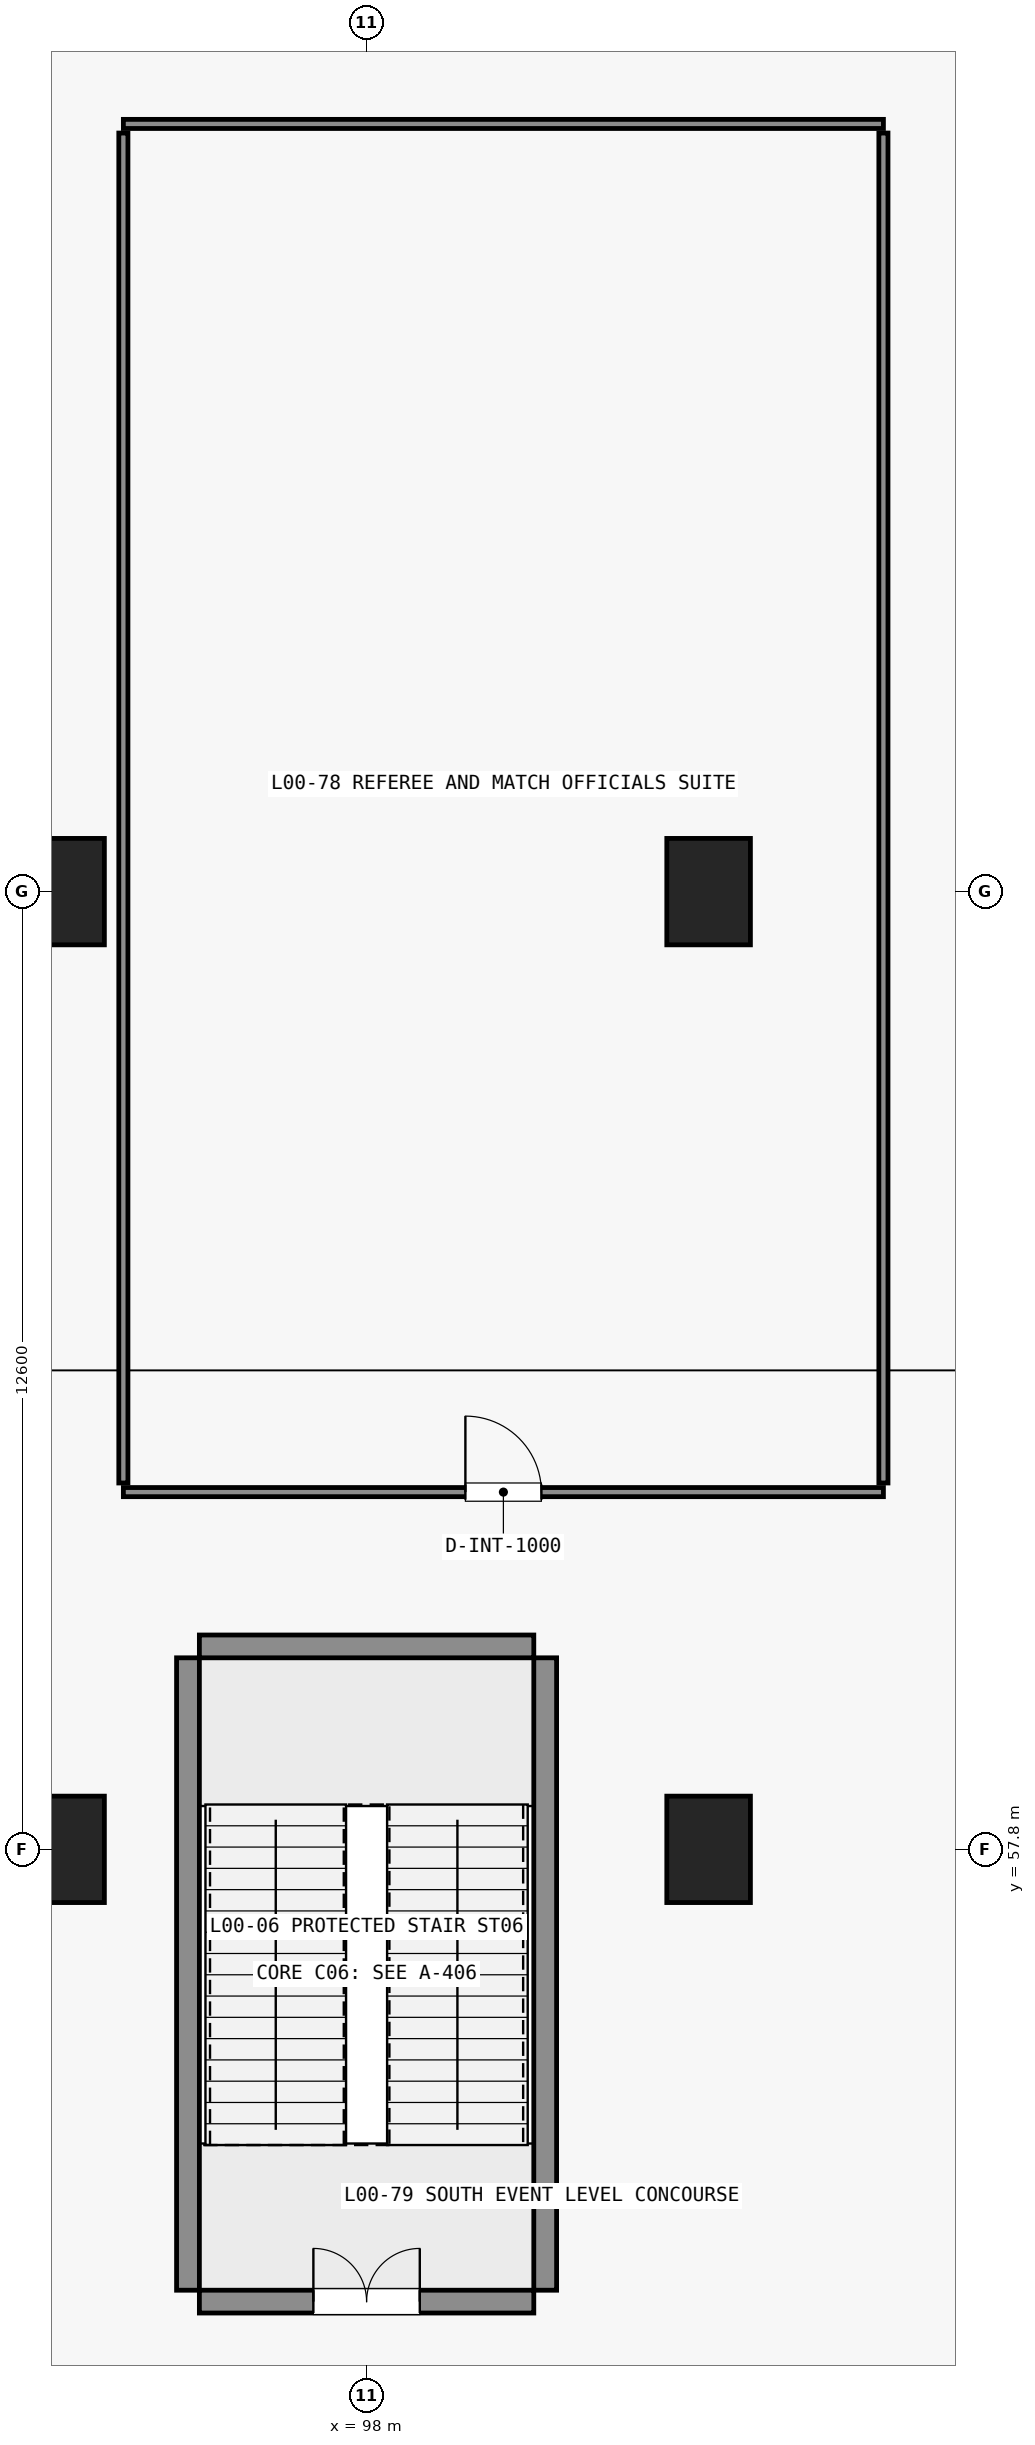
"""IFC4 building model, lengths in metres.
Left out: names, types, materials, properties, quantities, classifications, styles, units other than length and angle.
Written with IfcOpenShell. Run it as: python <this file> out.ifc"""

import sys

from ifc_helpers import new_model, si_unit, direction, frame, frame_2d, origin, origin_2d, place, context, subcontext, project, spatial, rectangle, extrude, element, fill, save


model = new_model("IFC4")
c1 = context("Model", 3, precision=1e-05, world=origin(), true_north=direction((0.0, 1.0)))
c2 = subcontext(c1, "Body", "Model", "MODEL_VIEW")
j1 = project(units=[si_unit("LENGTHUNIT", "METRE"), si_unit("PLANEANGLEUNIT", "RADIAN")], contexts=[c1])
p1 = place(None, origin())
s1 = spatial("IfcSite", under=j1, at=p1, CompositionType="ELEMENT")
p2 = place(p1, origin())
s2 = spatial("IfcBuilding", under=s1, at=p2, CompositionType="ELEMENT")
p3 = place(p2, origin())
s3 = spatial("IfcBuildingStorey", under=s2, at=p3, CompositionType="ELEMENT", Elevation=0.0)
for number, where, z_axis, x_axis in (
    (1, (94.0, 57.8, 0.0), (0.0, 0.0, 1.0), (1.0, 0.0, 0.0)),
    (2, (94.0, 70.4, 0.0), (0.0, 0.0, 1.0), (1.0, 0.0, 0.0)),
):
    element("IfcColumn", number, at=place(p3, frame(where, z_axis=z_axis, x_axis=x_axis)), inside=s3, PredefinedType="COLUMN", context=c2, shape_type="SweptSolid", body=[
        extrude(rectangle(XDim=1.1, YDim=1.4, at=origin_2d()), origin(), (0.0, 0.0, 1.0), 5.64),
    ])
for number, where, z_axis, x_axis in (
    (3, (102.5, 57.8, 0.0), (0.0, 0.0, 1.0), (1.0, 0.0, 0.0)),
    (4, (102.5, 70.4, 0.0), (0.0, 0.0, 1.0), (1.0, 0.0, 0.0)),
):
    element("IfcColumn", number, at=place(p3, frame(where, z_axis=z_axis, x_axis=x_axis)), inside=s3, PredefinedType="COLUMN", context=c2, shape_type="SweptSolid", body=[
        extrude(rectangle(XDim=1.1, YDim=1.4, at=origin_2d()), origin(), (0.0, 0.0, 1.0), 6.0),
    ])
p4 = place(p3, frame((95.8, 51.85, 0.0), z_axis=(0.0, 0.0, 1.0), x_axis=(1.0, 0.0, 0.0)))
e5 = element("IfcWall", 5, at=p4, inside=s3, PredefinedType="SHEAR", context=c2, shape_type="SweptSolid", body=[
    extrude(rectangle(XDim=4.4, YDim=0.3, at=frame_2d((2.2, 0.0))), origin(), (0.0, 0.0, 1.0), 6.0),
])
p5 = place(p4, frame((1.5, 0.0, 0.0)))
e6 = element("IfcOpeningElement", 6, at=p5, cuts=e5, PredefinedType="OPENING", context=c2, shape_type="SweptSolid", body=[
    extrude(rectangle(XDim=1.4, YDim=2.2, at=frame_2d((0.7, 1.1))), frame((0.0, 0.16, 0.0), z_axis=(0.0, -1.0, 0.0), x_axis=(1.0, 0.0, 0.0)), (0.0, 0.0, 1.0), 0.32),
])
p6 = place(p3, frame((95.8, 60.47, 0.0), z_axis=(0.0, 0.0, 1.0), x_axis=(1.0, 0.0, 0.0)))
e7 = element("IfcWall", 7, at=p6, inside=s3, PredefinedType="SHEAR", context=c2, shape_type="SweptSolid", body=[
    extrude(rectangle(XDim=4.4, YDim=0.3, at=frame_2d((2.2, 0.0))), origin(), (0.0, 0.0, 1.0), 6.0),
])
for number, where, z_axis, x_axis in (
    (8, (95.65, 52.0, 0.0), (0.0, 0.0, 1.0), (0.0, 1.0, 0.0)),
    (9, (100.35, 52.0, 0.0), (0.0, 0.0, 1.0), (0.0, 1.0, 0.0)),
):
    element("IfcWall", number, at=place(p3, frame(where, z_axis=z_axis, x_axis=x_axis)), inside=s3, PredefinedType="SHEAR", context=c2, shape_type="SweptSolid", body=[
        extrude(rectangle(XDim=8.32, YDim=0.3, at=frame_2d((4.16, 0.0))), origin(), (0.0, 0.0, 1.0), 6.0),
    ])
p7 = place(p3, frame((94.8, 62.5, 0.0), z_axis=(0.0, 0.0, 1.0), x_axis=(1.0, 0.0, 0.0)))
e10 = element("IfcWall", 10, at=p7, inside=s3, PredefinedType="PARTITIONING", context=c2, shape_type="SweptSolid", body=[
    extrude(rectangle(XDim=10.0, YDim=0.12, at=frame_2d((5.0, 0.0))), origin(), (0.0, 0.0, 1.0), 4.79),
])
p8 = place(p7, frame((4.5, 0.0, 0.0)))
e11 = element("IfcOpeningElement", 11, at=p8, cuts=e10, PredefinedType="OPENING", context=c2, shape_type="SweptSolid", body=[
    extrude(rectangle(XDim=1.0, YDim=2.15, at=frame_2d((0.5, 1.075))), frame((0.0, 0.07, 0.0), z_axis=(0.0, -1.0, 0.0), x_axis=(1.0, 0.0, 0.0)), (0.0, 0.0, 1.0), 0.14),
])
p9 = place(p3, frame((94.8, 80.5, 0.0), z_axis=(0.0, 0.0, 1.0), x_axis=(1.0, 0.0, 0.0)))
e12 = element("IfcWall", 12, at=p9, inside=s3, PredefinedType="PARTITIONING", context=c2, shape_type="SweptSolid", body=[
    extrude(rectangle(XDim=10.0, YDim=0.12, at=frame_2d((5.0, 0.0))), origin(), (0.0, 0.0, 1.0), 4.79),
])
for number, where, z_axis, x_axis in (
    (13, (94.8, 62.62, 0.0), (0.0, 0.0, 1.0), (0.0, 1.0, 0.0)),
    (14, (104.8, 62.62, 0.0), (0.0, 0.0, 1.0), (0.0, 1.0, 0.0)),
):
    element("IfcWall", number, at=place(p3, frame(where, z_axis=z_axis, x_axis=x_axis)), inside=s3, PredefinedType="PARTITIONING", context=c2, shape_type="SweptSolid", body=[
        extrude(rectangle(XDim=17.76, YDim=0.12, at=frame_2d((8.88, 0.0))), origin(), (0.0, 0.0, 1.0), 5.64),
    ])
p10 = place(p5, origin())
e15 = element("IfcDoor", 15, at=p10, inside=s3, OperationType="DOUBLE_DOOR_SINGLE_SWING", PredefinedType="DOOR", context=c2, shape_type="SweptSolid", body=[
    extrude(rectangle(XDim=1.4, YDim=2.2, at=frame_2d((0.7, 1.1))), frame((0.0, 0.025, 0.0), z_axis=(0.0, -1.0, 0.0), x_axis=(1.0, 0.0, 0.0)), (0.0, 0.0, 1.0), 0.05),
])
fill(e6, e15)
p11 = place(p8, origin())
e16 = element("IfcDoor", 16, at=p11, inside=s3, OperationType="SINGLE_SWING_LEFT", PredefinedType="DOOR", context=c2, shape_type="SweptSolid", body=[
    extrude(rectangle(XDim=1.0, YDim=2.15, at=frame_2d((0.5, 1.075))), frame((0.0, 0.025, 0.0), z_axis=(0.0, -1.0, 0.0), x_axis=(1.0, 0.0, 0.0)), (0.0, 0.0, 1.0), 0.05),
])
fill(e11, e16)
save(model, sys.argv[1])
